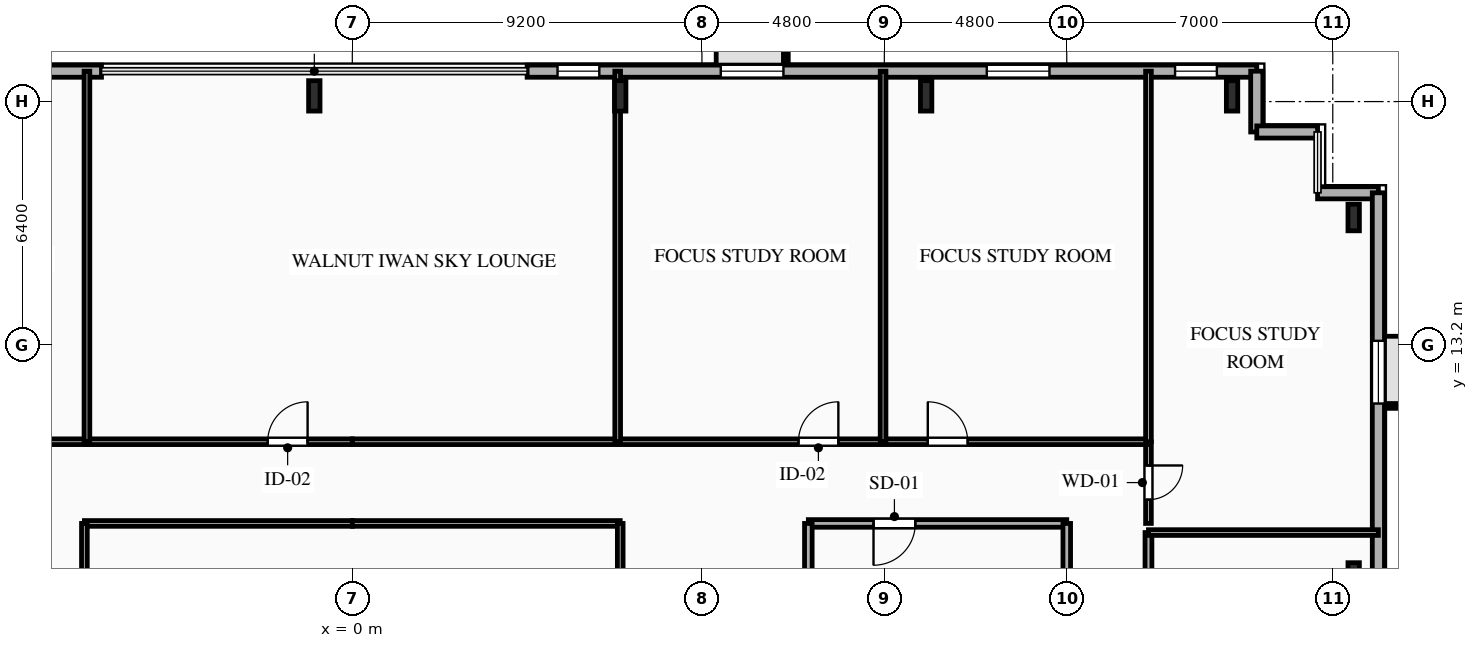
"""IFC4 building model, lengths in metres.
Left out: names, types, materials, properties, quantities, classifications, styles, units other than length and angle.
Written with IfcOpenShell. Run it as: python <this file> out.ifc"""

import sys

from ifc_helpers import new_model, si_unit, direction, frame, frame_2d, origin, origin_2d, place, context, subcontext, project, spatial, rectangle, i_section, extrude, element, fill, save


model = new_model("IFC4")
c1 = context("Model", 3, precision=1e-05, world=origin(), true_north=direction((0.0, 1.0)))
c2 = subcontext(c1, "Body", "Model", "MODEL_VIEW")
j1 = project(units=[si_unit("LENGTHUNIT", "METRE"), si_unit("PLANEANGLEUNIT", "RADIAN")], contexts=[c1])
p1 = place(None, origin())
s1 = spatial("IfcSite", under=j1, at=p1, CompositionType="ELEMENT")
p2 = place(p1, origin())
s2 = spatial("IfcBuilding", under=s1, at=p2, CompositionType="ELEMENT")
p3 = place(p2, frame((0.0, 0.0, 154.45)))
s3 = spatial("IfcBuildingStorey", under=s2, at=p3, CompositionType="ELEMENT", Elevation=154.45)
for number, where, z_axis, x_axis in (
    (1, (23.15, 19.75, 0.0), (0.0, 0.0, 1.0), (1.0, 0.0, 0.0)),
    (2, (15.1, 19.75, 0.0), (0.0, 0.0, 1.0), (1.0, 0.0, 0.0)),
    (3, (7.05, 19.75, 0.0), (0.0, 0.0, 1.0), (1.0, 0.0, 0.0)),
    (4, (-1.0, 19.75, 0.0), (0.0, 0.0, 1.0), (1.0, 0.0, 0.0)),
):
    element("IfcColumn", number, at=place(p3, frame(where, z_axis=z_axis, x_axis=x_axis)), inside=s3, PredefinedType="COLUMN", context=c2, shape_type="SweptSolid", body=[
        extrude(i_section(OverallWidth=0.3, OverallDepth=0.8, WebThickness=0.018, FlangeThickness=0.033, FilletRadius=0.03, at=origin_2d()), origin(), (0.0, 0.0, 1.0), 3.35),
    ])
for number, where, z_axis, x_axis in (
    (5, (26.35, 7.117, 0.0), (0.0, 0.0, 1.0), (1.0, 0.0, 0.0)),
    (6, (26.35, 16.55, 0.0), (0.0, 0.0, 1.0), (1.0, 0.0, 0.0)),
):
    element("IfcColumn", number, at=place(p3, frame(where, z_axis=z_axis, x_axis=x_axis)), inside=s3, PredefinedType="COLUMN", context=c2, shape_type="SweptSolid", body=[
        extrude(i_section(OverallWidth=0.3, OverallDepth=0.7, WebThickness=0.017, FlangeThickness=0.032, FilletRadius=0.027, at=origin_2d()), origin(), (0.0, 0.0, 1.0), 3.35),
    ])
p4 = place(p3, frame((-25.8, 20.4, 0.0), z_axis=(0.0, 0.0, 1.0), x_axis=(1.0, 0.0, 0.0)))
e7 = element("IfcWall", 7, at=p4, inside=s3, PredefinedType="SOLIDWALL", context=c2, shape_type="SweptSolid", body=[
    extrude(rectangle(XDim=19.2, YDim=0.32, at=frame_2d((9.6, 0.0))), origin(), (0.0, 0.0, 1.0), 3.04),
])
p5 = place(p4, frame((2.135, 0.0, 0.85)))
e8 = element("IfcOpeningElement", 8, at=p5, cuts=e7, PredefinedType="OPENING", context=c2, shape_type="SweptSolid", body=[
    extrude(rectangle(XDim=1.65, YDim=1.85, at=frame_2d((0.825, 0.925))), frame((0.0, 0.17, 0.0), z_axis=(0.0, -1.0, 0.0), x_axis=(1.0, 0.0, 0.0)), (0.0, 0.0, 1.0), 0.34),
])
p6 = place(p4, frame((10.68, 0.0, 0.85)))
e9 = element("IfcOpeningElement", 9, at=p6, cuts=e7, PredefinedType="OPENING", context=c2, shape_type="SweptSolid", body=[
    extrude(rectangle(XDim=2.4, YDim=1.95, at=frame_2d((1.2, 0.975))), frame((0.0, 0.17, 0.0), z_axis=(0.0, -1.0, 0.0), x_axis=(1.0, 0.0, 0.0)), (0.0, 0.0, 1.0), 0.34),
])
p7 = place(p3, frame((4.6, 20.4, 0.0), z_axis=(0.0, 0.0, 1.0), x_axis=(1.0, 0.0, 0.0)))
e10 = element("IfcWall", 10, at=p7, inside=s3, PredefinedType="SOLIDWALL", context=c2, shape_type="SweptSolid", body=[
    extrude(rectangle(XDim=19.2, YDim=0.32, at=frame_2d((9.6, 0.0))), origin(), (0.0, 0.0, 1.0), 3.04),
])
p8 = place(p7, frame((0.8, 0.0, 0.85)))
e11 = element("IfcOpeningElement", 11, at=p8, cuts=e10, PredefinedType="OPENING", context=c2, shape_type="SweptSolid", body=[
    extrude(rectangle(XDim=1.1, YDim=1.85, at=frame_2d((0.55, 0.925))), frame((0.0, 0.17, 0.0), z_axis=(0.0, -1.0, 0.0), x_axis=(1.0, 0.0, 0.0)), (0.0, 0.0, 1.0), 0.34),
])
p9 = place(p7, frame((5.095, 0.0, 0.85)))
e12 = element("IfcOpeningElement", 12, at=p9, cuts=e10, PredefinedType="OPENING", context=c2, shape_type="SweptSolid", body=[
    extrude(rectangle(XDim=1.65, YDim=1.85, at=frame_2d((0.825, 0.925))), frame((0.0, 0.17, 0.0), z_axis=(0.0, -1.0, 0.0), x_axis=(1.0, 0.0, 0.0)), (0.0, 0.0, 1.0), 0.34),
])
p10 = place(p7, frame((12.095, 0.0, 0.85)))
e13 = element("IfcOpeningElement", 13, at=p10, cuts=e10, PredefinedType="OPENING", context=c2, shape_type="SweptSolid", body=[
    extrude(rectangle(XDim=1.65, YDim=1.85, at=frame_2d((0.825, 0.925))), frame((0.0, 0.17, 0.0), z_axis=(0.0, -1.0, 0.0), x_axis=(1.0, 0.0, 0.0)), (0.0, 0.0, 1.0), 0.34),
])
p11 = place(p7, frame((17.05, 0.0, 0.85)))
e14 = element("IfcOpeningElement", 14, at=p11, cuts=e10, PredefinedType="OPENING", context=c2, shape_type="SweptSolid", body=[
    extrude(rectangle(XDim=1.1, YDim=1.85, at=frame_2d((0.55, 0.925))), frame((0.0, 0.17, 0.0), z_axis=(0.0, -1.0, 0.0), x_axis=(1.0, 0.0, 0.0)), (0.0, 0.0, 1.0), 0.34),
])
for number, where, z_axis, x_axis in (
    (15, (23.8, 20.4, 0.0), (0.0, 0.0, 1.0), (0.0, -1.0, 0.0)),
    (16, (23.8, 18.8, 0.0), (0.0, 0.0, 1.0), (1.0, 0.0, 0.0)),
):
    element("IfcWall", number, at=place(p3, frame(where, z_axis=z_axis, x_axis=x_axis)), inside=s3, PredefinedType="SOLIDWALL", context=c2, shape_type="SweptSolid", body=[
        extrude(rectangle(XDim=1.6, YDim=0.32, at=frame_2d((0.8, 0.0))), origin(), (0.0, 0.0, 1.0), 3.04),
    ])
p12 = place(p3, frame((25.4, 17.2, 0.0), z_axis=(0.0, 0.0, 1.0), x_axis=(1.0, 0.0, 0.0)))
e17 = element("IfcWall", 17, at=p12, inside=s3, PredefinedType="SOLIDWALL", context=c2, shape_type="SweptSolid", body=[
    extrude(rectangle(XDim=1.6, YDim=0.32, at=frame_2d((0.8, 0.0))), origin(), (0.0, 0.0, 1.0), 3.04),
])
p13 = place(p3, frame((27.0, 17.2, 0.0), z_axis=(0.0, 0.0, 1.0), x_axis=(0.0, -1.0, 0.0)))
e18 = element("IfcWall", 18, at=p13, inside=s3, PredefinedType="SOLIDWALL", context=c2, shape_type="SweptSolid", body=[
    extrude(rectangle(XDim=29.6, YDim=0.32, at=frame_2d((14.8, 0.0))), origin(), (0.0, 0.0, 1.0), 3.04),
])
p14 = place(p13, frame((3.895, 0.0, 0.85)))
e19 = element("IfcOpeningElement", 19, at=p14, cuts=e18, PredefinedType="OPENING", context=c2, shape_type="SweptSolid", body=[
    extrude(rectangle(XDim=1.65, YDim=1.85, at=frame_2d((0.825, 0.925))), frame((0.0, 0.17, 0.0), z_axis=(0.0, -1.0, 0.0), x_axis=(1.0, 0.0, 0.0)), (0.0, 0.0, 1.0), 0.34),
])
p15 = place(p13, frame((13.74, 0.0, 0.85)))
e20 = element("IfcOpeningElement", 20, at=p15, cuts=e18, PredefinedType="OPENING", context=c2, shape_type="SweptSolid", body=[
    extrude(rectangle(XDim=2.2, YDim=1.85, at=frame_2d((1.1, 0.925))), frame((0.0, 0.17, 0.0), z_axis=(0.0, -1.0, 0.0), x_axis=(1.0, 0.0, 0.0)), (0.0, 0.0, 1.0), 0.34),
])
p16 = place(p13, frame((24.135, 0.0, 0.85)))
e21 = element("IfcOpeningElement", 21, at=p16, cuts=e18, PredefinedType="OPENING", context=c2, shape_type="SweptSolid", body=[
    extrude(rectangle(XDim=1.65, YDim=1.85, at=frame_2d((0.825, 0.925))), frame((0.0, 0.17, 0.0), z_axis=(0.0, -1.0, 0.0), x_axis=(1.0, 0.0, 0.0)), (0.0, 0.0, 1.0), 0.34),
])
p17 = place(p3, frame((18.8, 8.5, 0.0), z_axis=(0.0, 0.0, 1.0), x_axis=(-1.0, 0.0, 0.0)))
e22 = element("IfcWall", 22, at=p17, inside=s3, PredefinedType="PARTITIONING", context=c2, shape_type="SweptSolid", body=[
    extrude(rectangle(XDim=6.8, YDim=0.2, at=frame_2d((3.4, 0.0))), origin(), (0.0, 0.0, 1.0), 3.04),
])
p18 = place(p17, frame((3.985, 0.0, 0.0)))
e23 = element("IfcOpeningElement", 23, at=p18, cuts=e22, PredefinedType="OPENING", context=c2, shape_type="SweptSolid", body=[
    extrude(rectangle(XDim=1.1, YDim=2.15, at=frame_2d((0.55, 1.075))), frame((0.0, 0.11, 0.0), z_axis=(0.0, -1.0, 0.0), x_axis=(1.0, 0.0, 0.0)), (0.0, 0.0, 1.0), 0.22),
])
p19 = place(p3, frame((18.8, 5.6, 0.0), z_axis=(0.0, 0.0, 1.0), x_axis=(0.0, 1.0, 0.0)))
e24 = element("IfcWall", 24, at=p19, inside=s3, PredefinedType="PARTITIONING", context=c2, shape_type="SweptSolid", body=[
    extrude(rectangle(XDim=2.9, YDim=0.2, at=frame_2d((1.45, 0.0))), origin(), (0.0, 0.0, 1.0), 2.525),
])
p20 = place(p3, frame((12.0, 8.5, 0.0), z_axis=(0.0, 0.0, 1.0), x_axis=(0.0, -1.0, 0.0)))
e25 = element("IfcWall", 25, at=p20, inside=s3, PredefinedType="PARTITIONING", context=c2, shape_type="SweptSolid", body=[
    extrude(rectangle(XDim=2.9, YDim=0.2, at=frame_2d((1.45, 0.0))), origin(), (0.0, 0.0, 1.0), 3.04),
])
p21 = place(p3, frame((-20.95, 10.65, 0.0), z_axis=(0.0, 0.0, 1.0), x_axis=(1.0, 0.0, 0.0)))
e26 = element("IfcWall", 26, at=p21, inside=s3, PredefinedType="PARTITIONING", context=c2, shape_type="SweptSolid", body=[
    extrude(rectangle(XDim=13.967, YDim=0.15, at=frame_2d((6.983, 0.0))), origin(), (0.0, 0.0, 1.0), 3.04),
])
p22 = place(p21, frame((6.458, 0.0, 0.0)))
e27 = element("IfcOpeningElement", 27, at=p22, cuts=e26, PredefinedType="OPENING", context=c2, shape_type="SweptSolid", body=[
    extrude(rectangle(XDim=1.05, YDim=2.15, at=frame_2d((0.525, 1.075))), frame((0.0, 0.085, 0.0), z_axis=(0.0, -1.0, 0.0), x_axis=(1.0, 0.0, 0.0)), (0.0, 0.0, 1.0), 0.17),
])
p23 = place(p3, frame((-6.983, 10.65, 0.0), z_axis=(0.0, 0.0, 1.0), x_axis=(1.0, 0.0, 0.0)))
e28 = element("IfcWall", 28, at=p23, inside=s3, PredefinedType="PARTITIONING", context=c2, shape_type="SweptSolid", body=[
    extrude(rectangle(XDim=6.983, YDim=0.15, at=frame_2d((3.491, 0.0))), origin(), (0.0, 0.0, 1.0), 3.04),
])
p24 = place(p23, frame((4.756, 0.0, 0.0)))
e29 = element("IfcOpeningElement", 29, at=p24, cuts=e28, PredefinedType="OPENING", context=c2, shape_type="SweptSolid", body=[
    extrude(rectangle(XDim=1.05, YDim=2.15, at=frame_2d((0.525, 1.075))), frame((0.0, 0.085, 0.0), z_axis=(0.0, -1.0, 0.0), x_axis=(1.0, 0.0, 0.0)), (0.0, 0.0, 1.0), 0.17),
])
p25 = place(p3, frame((0.0, 8.5, 0.0), z_axis=(0.0, 0.0, 1.0), x_axis=(-1.0, 0.0, 0.0)))
e30 = element("IfcWall", 30, at=p25, inside=s3, PredefinedType="PARTITIONING", context=c2, shape_type="SweptSolid", body=[
    extrude(rectangle(XDim=7.05, YDim=0.15, at=frame_2d((3.525, 0.0))), origin(), (0.0, 0.0, 1.0), 3.04),
])
p26 = place(p3, frame((20.95, 10.65, 0.0), z_axis=(0.0, 0.0, 1.0), x_axis=(0.0, -1.0, 0.0)))
e31 = element("IfcWall", 31, at=p26, inside=s3, PredefinedType="PARTITIONING", context=c2, shape_type="SweptSolid", body=[
    extrude(rectangle(XDim=2.15, YDim=0.15, at=frame_2d((1.075, 0.0))), origin(), (0.0, 0.0, 1.0), 3.04),
])
p27 = place(p26, frame((0.625, 0.0, 0.0)))
e32 = element("IfcOpeningElement", 32, at=p27, cuts=e31, PredefinedType="OPENING", context=c2, shape_type="SweptSolid", body=[
    extrude(rectangle(XDim=0.9, YDim=2.1, at=frame_2d((0.45, 1.05))), frame((0.0, 0.085, 0.0), z_axis=(0.0, -1.0, 0.0), x_axis=(1.0, 0.0, 0.0)), (0.0, 0.0, 1.0), 0.17),
])
p28 = place(p3, frame((0.0, 10.65, 0.0), z_axis=(0.0, 0.0, 1.0), x_axis=(1.0, 0.0, 0.0)))
e33 = element("IfcWall", 33, at=p28, inside=s3, PredefinedType="PARTITIONING", context=c2, shape_type="SweptSolid", body=[
    extrude(rectangle(XDim=6.983, YDim=0.15, at=frame_2d((3.491, 0.0))), origin(), (0.0, 0.0, 1.0), 3.04),
])
p29 = place(p3, frame((6.983, 10.65, 0.0), z_axis=(0.0, 0.0, 1.0), x_axis=(1.0, 0.0, 0.0)))
e34 = element("IfcWall", 34, at=p29, inside=s3, PredefinedType="PARTITIONING", context=c2, shape_type="SweptSolid", body=[
    extrude(rectangle(XDim=6.984, YDim=0.15, at=frame_2d((3.492, 0.0))), origin(), (0.0, 0.0, 1.0), 3.04),
])
p30 = place(p29, frame((4.757, 0.0, 0.0)))
e35 = element("IfcOpeningElement", 35, at=p30, cuts=e34, PredefinedType="OPENING", context=c2, shape_type="SweptSolid", body=[
    extrude(rectangle(XDim=1.05, YDim=2.15, at=frame_2d((0.525, 1.075))), frame((0.0, 0.085, 0.0), z_axis=(0.0, -1.0, 0.0), x_axis=(1.0, 0.0, 0.0)), (0.0, 0.0, 1.0), 0.17),
])
p31 = place(p3, frame((13.967, 10.65, 0.0), z_axis=(0.0, 0.0, 1.0), x_axis=(1.0, 0.0, 0.0)))
e36 = element("IfcWall", 36, at=p31, inside=s3, PredefinedType="PARTITIONING", context=c2, shape_type="SweptSolid", body=[
    extrude(rectangle(XDim=6.983, YDim=0.15, at=frame_2d((3.492, 0.0))), origin(), (0.0, 0.0, 1.0), 3.04),
])
p32 = place(p31, frame((1.177, 0.0, 0.0)))
e37 = element("IfcOpeningElement", 37, at=p32, cuts=e36, PredefinedType="OPENING", context=c2, shape_type="SweptSolid", body=[
    extrude(rectangle(XDim=1.05, YDim=2.15, at=frame_2d((0.525, 1.075))), frame((0.0, 0.085, 0.0), z_axis=(0.0, -1.0, 0.0), x_axis=(1.0, 0.0, 0.0)), (0.0, 0.0, 1.0), 0.17),
])
p33 = place(p3, frame((7.05, 8.5, 0.0), z_axis=(0.0, 0.0, 1.0), x_axis=(-1.0, 0.0, 0.0)))
e38 = element("IfcWall", 38, at=p33, inside=s3, PredefinedType="PARTITIONING", context=c2, shape_type="SweptSolid", body=[
    extrude(rectangle(XDim=7.05, YDim=0.15, at=frame_2d((3.525, 0.0))), origin(), (0.0, 0.0, 1.0), 3.04),
])
p34 = place(p3, frame((20.95, 8.26, 0.0), z_axis=(0.0, 0.0, 1.0), x_axis=(0.0, -1.0, 0.0)))
e39 = element("IfcWall", 39, at=p34, inside=s3, PredefinedType="PARTITIONING", context=c2, shape_type="SweptSolid", body=[
    extrude(rectangle(XDim=9.57, YDim=0.18, at=frame_2d((4.785, 0.0))), origin(), (0.0, 0.0, 1.0), 3.04),
])
p35 = place(p34, frame((7.064, 0.0, 0.0)))
e40 = element("IfcOpeningElement", 40, at=p35, cuts=e39, PredefinedType="OPENING", context=c2, shape_type="SweptSolid", body=[
    extrude(rectangle(XDim=1.0, YDim=2.15, at=frame_2d((0.5, 1.075))), frame((0.0, 0.1, 0.0), z_axis=(0.0, -1.0, 0.0), x_axis=(1.0, 0.0, 0.0)), (0.0, 0.0, 1.0), 0.2),
])
for number, where, z_axis, x_axis in (
    (41, (-7.05, 8.5, 0.0), (0.0, 0.0, 1.0), (0.0, -1.0, 0.0)),
    (42, (7.05, -0.8, 0.0), (0.0, 0.0, 1.0), (0.0, 1.0, 0.0)),
):
    element("IfcWall", number, at=place(p3, frame(where, z_axis=z_axis, x_axis=x_axis)), inside=s3, PredefinedType="PARTITIONING", context=c2, shape_type="SweptSolid", body=[
        extrude(rectangle(XDim=9.3, YDim=0.15, at=frame_2d((4.65, 0.0))), origin(), (0.0, 0.0, 1.0), 3.04),
    ])
p36 = place(p3, frame((20.95, 8.26, 0.0), z_axis=(0.0, 0.0, 1.0), x_axis=(1.0, 0.0, 0.0)))
e43 = element("IfcWall", 43, at=p36, inside=s3, PredefinedType="PARTITIONING", context=c2, shape_type="SweptSolid", body=[
    extrude(rectangle(XDim=6.05, YDim=0.15, at=frame_2d((3.025, 0.0))), origin(), (0.0, 0.0, 1.0), 3.04),
])
p37 = place(p3, frame((20.95, 10.65, 0.0), z_axis=(0.0, 0.0, 1.0), x_axis=(0.0, 1.0, 0.0)))
e44 = element("IfcWall", 44, at=p37, inside=s3, PredefinedType="PARTITIONING", context=c2, shape_type="SweptSolid", body=[
    extrude(rectangle(XDim=9.75, YDim=0.15, at=frame_2d((4.875, 0.0))), origin(), (0.0, 0.0, 1.0), 2.525),
])
p38 = place(p3, frame((-6.983, 20.4, 0.0), z_axis=(0.0, 0.0, 1.0), x_axis=(0.0, -1.0, 0.0)))
e45 = element("IfcWall", 45, at=p38, inside=s3, PredefinedType="PARTITIONING", context=c2, shape_type="SweptSolid", body=[
    extrude(rectangle(XDim=9.75, YDim=0.15, at=frame_2d((4.875, 0.0))), origin(), (0.0, 0.0, 1.0), 3.04),
])
p39 = place(p3, frame((6.983, 20.4, 0.0), z_axis=(0.0, 0.0, 1.0), x_axis=(0.0, -1.0, 0.0)))
e46 = element("IfcWall", 46, at=p39, inside=s3, PredefinedType="PARTITIONING", context=c2, shape_type="SweptSolid", body=[
    extrude(rectangle(XDim=9.75, YDim=0.15, at=frame_2d((4.875, 0.0))), origin(), (0.0, 0.0, 1.0), 2.525),
])
p40 = place(p3, frame((13.967, 20.4, 0.0), z_axis=(0.0, 0.0, 1.0), x_axis=(0.0, -1.0, 0.0)))
e47 = element("IfcWall", 47, at=p40, inside=s3, PredefinedType="PARTITIONING", context=c2, shape_type="SweptSolid", body=[
    extrude(rectangle(XDim=9.75, YDim=0.15, at=frame_2d((4.875, 0.0))), origin(), (0.0, 0.0, 1.0), 3.04),
])
p41 = place(p8, origin())
e48 = element("IfcWindow", 48, at=p41, inside=s3, PartitioningType="SINGLE_PANEL", PredefinedType="WINDOW", context=c2, shape_type="SweptSolid", body=[
    extrude(rectangle(XDim=1.1, YDim=1.85, at=frame_2d((0.55, 0.925))), frame((0.0, 0.03, 0.0), z_axis=(0.0, -1.0, 0.0), x_axis=(1.0, 0.0, 0.0)), (0.0, 0.0, 1.0), 0.06),
])
fill(e11, e48)
p42 = place(p9, origin())
e49 = element("IfcWindow", 49, at=p42, inside=s3, PartitioningType="SINGLE_PANEL", PredefinedType="WINDOW", context=c2, shape_type="SweptSolid", body=[
    extrude(rectangle(XDim=1.65, YDim=1.85, at=frame_2d((0.825, 0.925))), frame((0.0, 0.03, 0.0), z_axis=(0.0, -1.0, 0.0), x_axis=(1.0, 0.0, 0.0)), (0.0, 0.0, 1.0), 0.06),
])
fill(e12, e49)
p43 = place(p10, origin())
e50 = element("IfcWindow", 50, at=p43, inside=s3, PartitioningType="SINGLE_PANEL", PredefinedType="WINDOW", context=c2, shape_type="SweptSolid", body=[
    extrude(rectangle(XDim=1.65, YDim=1.85, at=frame_2d((0.825, 0.925))), frame((0.0, 0.03, 0.0), z_axis=(0.0, -1.0, 0.0), x_axis=(1.0, 0.0, 0.0)), (0.0, 0.0, 1.0), 0.06),
])
fill(e13, e50)
p44 = place(p11, origin())
e51 = element("IfcWindow", 51, at=p44, inside=s3, PartitioningType="SINGLE_PANEL", PredefinedType="WINDOW", context=c2, shape_type="SweptSolid", body=[
    extrude(rectangle(XDim=1.1, YDim=1.85, at=frame_2d((0.55, 0.925))), frame((0.0, 0.03, 0.0), z_axis=(0.0, -1.0, 0.0), x_axis=(1.0, 0.0, 0.0)), (0.0, 0.0, 1.0), 0.06),
])
fill(e14, e51)
p45 = place(p14, origin())
e52 = element("IfcWindow", 52, at=p45, inside=s3, PartitioningType="SINGLE_PANEL", PredefinedType="WINDOW", context=c2, shape_type="SweptSolid", body=[
    extrude(rectangle(XDim=1.65, YDim=1.85, at=frame_2d((0.825, 0.925))), frame((0.0, 0.03, 0.0), z_axis=(0.0, -1.0, 0.0), x_axis=(1.0, 0.0, 0.0)), (0.0, 0.0, 1.0), 0.06),
])
fill(e19, e52)
p46 = place(p18, origin())
e53 = element("IfcDoor", 53, at=p46, inside=s3, OperationType="SINGLE_SWING_RIGHT", PredefinedType="DOOR", context=c2, shape_type="SweptSolid", body=[
    extrude(rectangle(XDim=1.1, YDim=2.15, at=frame_2d((0.55, 1.075))), frame((0.0, 0.025, 0.0), z_axis=(0.0, -1.0, 0.0), x_axis=(1.0, 0.0, 0.0)), (0.0, 0.0, 1.0), 0.05),
])
fill(e23, e53)
p47 = place(p24, origin())
e54 = element("IfcDoor", 54, at=p47, inside=s3, OperationType="SINGLE_SWING_RIGHT", PredefinedType="DOOR", context=c2, shape_type="SweptSolid", body=[
    extrude(rectangle(XDim=1.05, YDim=2.15, at=frame_2d((0.525, 1.075))), frame((0.0, 0.025, 0.0), z_axis=(0.0, -1.0, 0.0), x_axis=(1.0, 0.0, 0.0)), (0.0, 0.0, 1.0), 0.05),
])
fill(e29, e54)
p48 = place(p27, origin())
e55 = element("IfcDoor", 55, at=p48, inside=s3, OperationType="SINGLE_SWING_LEFT", PredefinedType="DOOR", context=c2, shape_type="SweptSolid", body=[
    extrude(rectangle(XDim=0.9, YDim=2.1, at=frame_2d((0.45, 1.05))), frame((0.0, 0.025, 0.0), z_axis=(0.0, -1.0, 0.0), x_axis=(1.0, 0.0, 0.0)), (0.0, 0.0, 1.0), 0.05),
])
fill(e32, e55)
p49 = place(p30, origin())
e56 = element("IfcDoor", 56, at=p49, inside=s3, OperationType="SINGLE_SWING_RIGHT", PredefinedType="DOOR", context=c2, shape_type="SweptSolid", body=[
    extrude(rectangle(XDim=1.05, YDim=2.15, at=frame_2d((0.525, 1.075))), frame((0.0, 0.025, 0.0), z_axis=(0.0, -1.0, 0.0), x_axis=(1.0, 0.0, 0.0)), (0.0, 0.0, 1.0), 0.05),
])
fill(e35, e56)
p50 = place(p32, origin())
e57 = element("IfcDoor", 57, at=p50, inside=s3, OperationType="SINGLE_SWING_LEFT", PredefinedType="DOOR", context=c2, shape_type="SweptSolid", body=[
    extrude(rectangle(XDim=1.05, YDim=2.15, at=frame_2d((0.525, 1.075))), frame((0.0, 0.025, 0.0), z_axis=(0.0, -1.0, 0.0), x_axis=(1.0, 0.0, 0.0)), (0.0, 0.0, 1.0), 0.05),
])
fill(e37, e57)
save(model, sys.argv[1])
